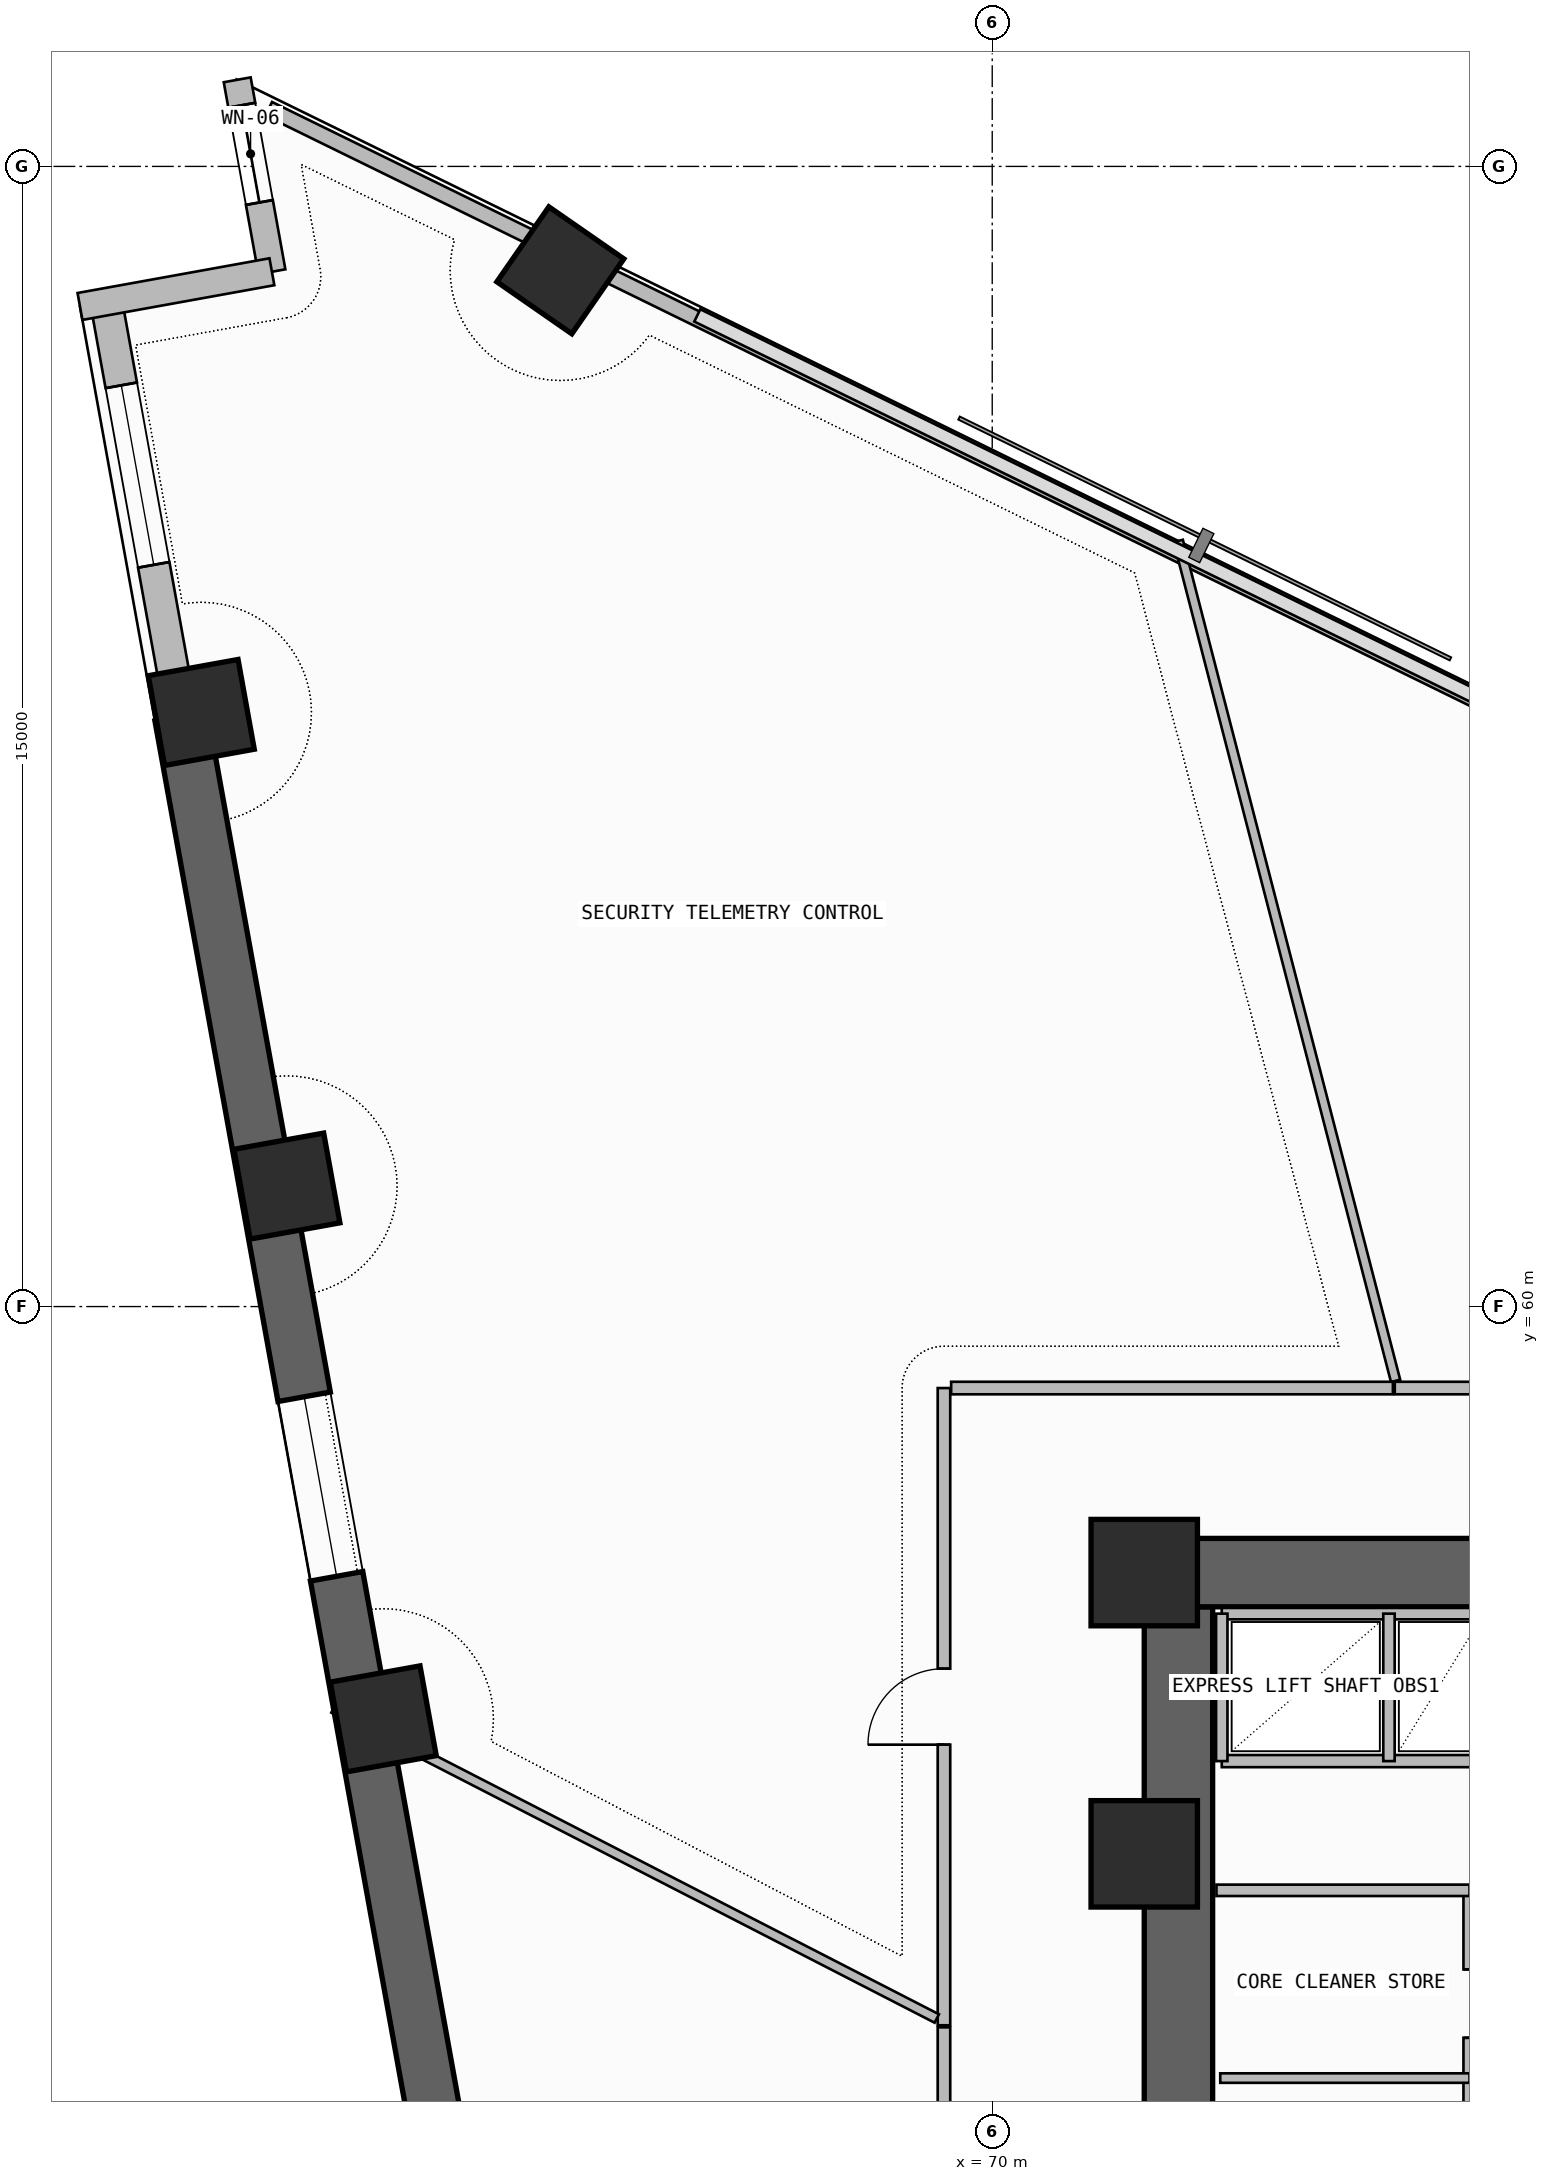
"""IFC4 building model, lengths in metres.
Left out: names, types, materials, properties, quantities, classifications, styles, units other than length and angle.
Written with IfcOpenShell. Run it as: python <this file> out.ifc"""

import sys

from ifc_helpers import new_model, si_unit, direction, frame, frame_2d, origin, origin_2d, place, context, subcontext, project, spatial, rectangle, extrude, element, fill, save


model = new_model("IFC4")
c1 = context("Model", 3, precision=1e-05, world=origin(), true_north=direction((0.0, 1.0)))
c2 = subcontext(c1, "Body", "Model", "MODEL_VIEW")
j1 = project(units=[si_unit("LENGTHUNIT", "METRE"), si_unit("PLANEANGLEUNIT", "RADIAN")], contexts=[c1])
p1 = place(None, origin())
s1 = spatial("IfcSite", under=j1, at=p1, CompositionType="ELEMENT")
p2 = place(p1, origin())
s2 = spatial("IfcBuilding", under=s1, at=p2, CompositionType="ELEMENT")
p3 = place(p2, frame((0.0, 0.0, 113.7)))
s3 = spatial("IfcBuildingStorey", under=s2, at=p3, CompositionType="ELEMENT", Elevation=113.7)
p4 = place(p3, frame((72.45, 43.35, -0.26), z_axis=(0.0, 0.0, 1.0), x_axis=(0.0, 1.0, 0.0)))
e1 = element("IfcWall", 1, at=p4, inside=s3, PredefinedType="SHEAR", context=c2, shape_type="SweptSolid", body=[
    extrude(rectangle(XDim=12.7, YDim=0.9, at=frame_2d((6.35, 0.0))), origin(), (0.0, 0.0, 1.0), 3.6),
])
p5 = place(p4, frame((1.35, 0.0, 0.26)))
e2 = element("IfcOpeningElement", 2, at=p5, cuts=e1, PredefinedType="OPENING", context=c2, shape_type="SweptSolid", body=[
    extrude(rectangle(XDim=1.2, YDim=2.2, at=frame_2d((0.6, 1.1))), frame((0.0, 0.46, 0.0), z_axis=(0.0, -1.0, 0.0), x_axis=(1.0, 0.0, 0.0)), (0.0, 0.0, 1.0), 0.92),
])
p6 = place(p3, frame((72.0, 56.5, -0.26), z_axis=(0.0, 0.0, 1.0), x_axis=(1.0, 0.0, 0.0)))
e3 = element("IfcWall", 3, at=p6, inside=s3, PredefinedType="SHEAR", context=c2, shape_type="SweptSolid", body=[
    extrude(rectangle(XDim=13.9, YDim=0.9, at=frame_2d((6.95, 0.0))), origin(), (0.0, 0.0, 1.0), 3.6),
])
for number, where, z_axis, x_axis in (
    (4, (72.0, 52.8, 0.0), (0.0, 0.0, 1.0), (1.0, 0.0, 0.0)),
    (5, (72.0, 56.5, 0.0), (0.0, 0.0, 1.0), (1.0, 0.0, 0.0)),
):
    element("IfcColumn", number, at=place(p3, frame(where, z_axis=z_axis, x_axis=x_axis)), inside=s3, PredefinedType="COLUMN", context=c2, shape_type="SweptSolid", body=[
        extrude(rectangle(XDim=1.4, YDim=1.4, at=origin_2d()), origin(), (0.0, 0.0, 1.0), 3.6),
    ])
for number, where, z_axis, x_axis in (
    (6, (64.318, 73.633, 0.0), (0.0, 0.0, 1.0), (0.57, 0.822, 0.0)),
    (7, (59.594, 67.816, 0.0), (0.0, 0.0, 1.0), (-0.178, 0.984, 0.0)),
    (8, (60.72, 61.585, 0.0), (0.0, 0.0, 1.0), (-0.178, 0.984, 0.0)),
    (9, (61.988, 54.575, 0.0), (0.0, 0.0, 1.0), (-0.178, 0.984, 0.0)),
):
    element("IfcColumn", number, at=place(p3, frame(where, z_axis=z_axis, x_axis=x_axis)), inside=s3, PredefinedType="COLUMN", context=c2, shape_type="SweptSolid", body=[
        extrude(rectangle(XDim=1.2, YDim=1.2, at=origin_2d()), origin(), (0.0, 0.0, 1.0), 3.6),
    ])
p7 = place(p3, frame((58.342, 73.22, 0.0), z_axis=(0.0, 0.0, 1.0), x_axis=(0.177981837245, -0.984033772597, 0.0)))
e10 = element("IfcWall", 10, at=p7, inside=s3, PredefinedType="SOLIDWALL", context=c2, shape_type="SweptSolid", body=[
    extrude(rectangle(XDim=5.54, YDim=0.42, at=frame_2d((2.77, 0.0))), origin(), (0.0, 0.0, 1.0), 2.725),
])
p8 = place(p7, frame((1.118, 0.0, 1.2)))
e11 = element("IfcOpeningElement", 11, at=p8, cuts=e10, PredefinedType="OPENING", context=c2, shape_type="SweptSolid", body=[
    extrude(rectangle(XDim=2.4, YDim=0.9, at=frame_2d((1.2, 0.45))), frame((0.0, 0.22, 0.0), z_axis=(0.0, -1.0, 0.0), x_axis=(1.0, 0.0, 0.0)), (0.0, 0.0, 1.0), 0.44),
])
p9 = place(p3, frame((59.328, 67.768, -0.26), z_axis=(0.0, 0.0, 1.0), x_axis=(0.177933213615, -0.984042565895, 0.0)))
e12 = element("IfcWall", 12, at=p9, inside=s3, PredefinedType="SHEAR", context=c2, shape_type="SweptSolid", body=[
    extrude(rectangle(XDim=20.579, YDim=0.7, at=frame_2d((10.289, 0.0))), origin(), (0.0, 0.0, 1.0), 3.6),
])
p10 = place(p9, frame((9.1, 0.0, 1.2)))
e13 = element("IfcOpeningElement", 13, at=p10, cuts=e12, PredefinedType="OPENING", context=c2, shape_type="SweptSolid", body=[
    extrude(rectangle(XDim=2.4, YDim=0.9, at=frame_2d((1.2, 0.45))), frame((0.0, 0.36, 0.0), z_axis=(0.0, -1.0, 0.0), x_axis=(1.0, 0.0, 0.0)), (0.0, 0.0, 1.0), 0.72),
])
p11 = place(p3, frame((60.066, 76.139, 0.0), z_axis=(0.0, 0.0, 1.0), x_axis=(0.177897493713, -0.984049024048, 0.0)))
e14 = element("IfcWall", 14, at=p11, inside=s3, PredefinedType="SOLIDWALL", context=c2, shape_type="SweptSolid", body=[
    extrude(rectangle(XDim=2.566, YDim=0.36, at=frame_2d((1.283, 0.0))), origin(), (0.0, 0.0, 1.0), 3.34),
])
p12 = place(p11, frame((0.34, 0.0, 0.45)))
e15 = element("IfcOpeningElement", 15, at=p12, cuts=e14, PredefinedType="OPENING", context=c2, shape_type="SweptSolid", body=[
    extrude(rectangle(XDim=1.3, YDim=2.4, at=frame_2d((0.65, 1.2))), frame((0.0, 0.19, 0.0), z_axis=(0.0, -1.0, 0.0), x_axis=(1.0, 0.0, 0.0)), (0.0, 0.0, 1.0), 0.38),
])
p13 = place(p3, frame((60.523, 73.614, 0.0), z_axis=(0.0, 0.0, 1.0), x_axis=(-0.984046012923, -0.177914149102, 0.0)))
e16 = element("IfcWall", 16, at=p13, inside=s3, PredefinedType="SOLIDWALL", context=c2, shape_type="SweptSolid", body=[
    extrude(rectangle(XDim=2.566, YDim=0.36, at=frame_2d((1.283, 0.0))), origin(), (0.0, 0.0, 1.0), 3.34),
])
p14 = place(p3, frame((88.921, 61.823, 0.0), z_axis=(0.0, 0.0, 1.0), x_axis=(-0.897993533426, 0.440008652103, 0.0)))
e17 = element("IfcWall", 17, at=p14, inside=s3, PredefinedType="PARAPET", context=c2, shape_type="SweptSolid", body=[
    extrude(rectangle(XDim=26.864, YDim=0.2, at=frame_2d((13.432, 0.0))), origin(), (0.0, 0.0, 1.0), 1.15),
])
p15 = place(p3, frame((64.032, 74.018, 0.0), z_axis=(0.0, 0.0, 1.0), x_axis=(-0.89799103332, 0.440013754417, 0.0)))
e18 = element("IfcWall", 18, at=p15, inside=s3, PredefinedType="PARAPET", context=c2, shape_type="SweptSolid", body=[
    extrude(rectangle(XDim=3.955, YDim=0.2, at=frame_2d((1.978, 0.0))), origin(), (0.0, 0.0, 1.0), 1.15),
])
p16 = place(p3, frame((76.28, 47.18, 0.0), z_axis=(0.0, 0.0, 1.0), x_axis=(0.0, 1.0, 0.0)))
e19 = element("IfcWall", 19, at=p16, inside=s3, PredefinedType="SOLIDWALL", context=c2, shape_type="SweptSolid", body=[
    extrude(rectangle(XDim=5.14, YDim=0.16, at=frame_2d((2.57, 0.0))), origin(), (0.0, 0.0, 1.0), 3.34),
])
p17 = place(p16, frame((0.75, 0.0, 0.0)))
e20 = element("IfcOpeningElement", 20, at=p17, cuts=e19, PredefinedType="OPENING", context=c2, shape_type="SweptSolid", body=[
    extrude(rectangle(XDim=1.0, YDim=2.2, at=frame_2d((0.5, 1.1))), frame((0.0, 0.09, 0.0), z_axis=(0.0, -1.0, 0.0), x_axis=(1.0, 0.0, 0.0)), (0.0, 0.0, 1.0), 0.18),
])
p18 = place(p16, frame((3.2, 0.0, 0.0)))
e21 = element("IfcOpeningElement", 21, at=p18, cuts=e19, PredefinedType="OPENING", context=c2, shape_type="SweptSolid", body=[
    extrude(rectangle(XDim=0.9, YDim=2.1, at=frame_2d((0.45, 1.05))), frame((0.0, 0.09, 0.0), z_axis=(0.0, -1.0, 0.0), x_axis=(1.0, 0.0, 0.0)), (0.0, 0.0, 1.0), 0.18),
])
p19 = place(p3, frame((72.95, 52.32, 0.0), z_axis=(0.0, 0.0, 1.0), x_axis=(1.0, 0.0, 0.0)))
e22 = element("IfcWall", 22, at=p19, inside=s3, PredefinedType="SOLIDWALL", context=c2, shape_type="SweptSolid", body=[
    extrude(rectangle(XDim=3.33, YDim=0.15, at=frame_2d((1.665, 0.0))), origin(), (0.0, 0.0, 1.0), 3.34),
])
p20 = place(p3, frame((73.0, 49.85, 0.0), z_axis=(0.0, 0.0, 1.0), x_axis=(1.0, 0.0, 0.0)))
e23 = element("IfcWall", 23, at=p20, inside=s3, PredefinedType="PARTITIONING", context=c2, shape_type="SweptSolid", body=[
    extrude(rectangle(XDim=3.28, YDim=0.125, at=frame_2d((1.64, 0.0))), origin(), (0.0, 0.0, 1.0), 3.34),
])
p21 = place(p3, frame((73.02, 54.02, 0.0), z_axis=(0.0, 0.0, 1.0), x_axis=(1.0, 0.0, 0.0)))
e24 = element("IfcWall", 24, at=p21, inside=s3, PredefinedType="SOLIDWALL", context=c2, shape_type="SweptSolid", body=[
    extrude(rectangle(XDim=12.08, YDim=0.16, at=frame_2d((6.04, 0.0))), origin(), (0.0, 0.0, 1.0), 3.34),
])
p22 = place(p3, frame((73.02, 55.96, 0.0), z_axis=(0.0, 0.0, 1.0), x_axis=(1.0, 0.0, 0.0)))
e25 = element("IfcWall", 25, at=p22, inside=s3, PredefinedType="SOLIDWALL", context=c2, shape_type="SweptSolid", body=[
    extrude(rectangle(XDim=3.5, YDim=0.15, at=frame_2d((1.75, 0.0))), origin(), (0.0, 0.0, 1.0), 3.34),
])
for number, where, z_axis, x_axis in (
    (26, (73.02, 54.02, 0.0), (0.0, 0.0, 1.0), (0.0, 1.0, 0.0)),
    (27, (75.22, 54.02, 0.0), (0.0, 0.0, 1.0), (0.0, 1.0, 0.0)),
):
    element("IfcWall", number, at=place(p3, frame(where, z_axis=z_axis, x_axis=x_axis)), inside=s3, PredefinedType="PLUMBINGWALL", context=c2, shape_type="SweptSolid", body=[
        extrude(rectangle(XDim=1.94, YDim=0.15, at=frame_2d((0.97, 0.0))), origin(), (0.0, 0.0, 1.0), 3.34),
    ])
p23 = place(p3, frame((93.396, 58.928, 0.0), z_axis=(0.0, 0.0, 1.0), x_axis=(-1.0, 0.0, 0.0)))
e28 = element("IfcWall", 28, at=p23, inside=s3, PredefinedType="PARTITIONING", context=c2, shape_type="SweptSolid", body=[
    extrude(rectangle(XDim=18.1, YDim=0.165, at=frame_2d((9.05, 0.0))), origin(), (0.0, 0.0, 1.0), 2.725),
])
p24 = place(p23, frame((3.874, 0.0, 0.0)))
e29 = element("IfcOpeningElement", 29, at=p24, cuts=e28, PredefinedType="OPENING", context=c2, shape_type="SweptSolid", body=[
    extrude(rectangle(XDim=1.0, YDim=2.2, at=frame_2d((0.5, 1.1))), frame((0.0, 0.093, 0.0), z_axis=(0.0, -1.0, 0.0), x_axis=(1.0, 0.0, 0.0)), (0.0, 0.0, 1.0), 0.185),
])
p25 = place(p3, frame((75.307, 59.022, 0.0), z_axis=(0.0, 0.0, 1.0), x_axis=(-0.250514518309, 0.968112842656, 0.0)))
e30 = element("IfcWall", 30, at=p25, inside=s3, PredefinedType="PARTITIONING", context=c2, shape_type="SweptSolid", body=[
    extrude(rectangle(XDim=11.414, YDim=0.125, at=frame_2d((5.707, 0.0))), origin(), (0.0, 0.0, 1.0), 3.34),
])
p26 = place(p3, frame((69.365, 58.928, 0.0), z_axis=(0.0, 0.0, 1.0), x_axis=(0.0, -1.0, 0.0)))
e31 = element("IfcWall", 31, at=p26, inside=s3, PredefinedType="PARTITIONING", context=c2, shape_type="SweptSolid", body=[
    extrude(rectangle(XDim=8.384, YDim=0.165, at=frame_2d((4.192, 0.0))), origin(), (0.0, 0.0, 1.0), 2.725),
])
p27 = place(p26, frame((3.692, 0.0, 0.0)))
e32 = element("IfcOpeningElement", 32, at=p27, cuts=e31, PredefinedType="OPENING", context=c2, shape_type="SweptSolid", body=[
    extrude(rectangle(XDim=1.0, YDim=2.2, at=frame_2d((0.5, 1.1))), frame((0.0, 0.093, 0.0), z_axis=(0.0, -1.0, 0.0), x_axis=(1.0, 0.0, 0.0)), (0.0, 0.0, 1.0), 0.185),
])
p28 = place(p3, frame((75.271, 58.928, 0.0), z_axis=(0.0, 0.0, 1.0), x_axis=(-1.0, 0.0, 0.0)))
e33 = element("IfcWall", 33, at=p28, inside=s3, PredefinedType="PARTITIONING", context=c2, shape_type="SweptSolid", body=[
    extrude(rectangle(XDim=5.812, YDim=0.165, at=frame_2d((2.906, 0.0))), origin(), (0.0, 0.0, 1.0), 2.725),
])
p29 = place(p3, frame((69.271, 50.634, 0.0), z_axis=(0.0, 0.0, 1.0), x_axis=(-0.889409837341, 0.457110644418, 0.0)))
e34 = element("IfcWall", 34, at=p29, inside=s3, PredefinedType="PARTITIONING", context=c2, shape_type="SweptSolid", body=[
    extrude(rectangle(XDim=8.925, YDim=0.125, at=frame_2d((4.462, 0.0))), origin(), (0.0, 0.0, 1.0), 2.725),
])
p30 = place(p3, frame((69.365, 50.518, 0.0), z_axis=(0.0, 0.0, 1.0), x_axis=(0.0, -1.0, 0.0)))
e35 = element("IfcWall", 35, at=p30, inside=s3, PredefinedType="PARTITIONING", context=c2, shape_type="SweptSolid", body=[
    extrude(rectangle(XDim=8.345, YDim=0.165, at=frame_2d((4.173, 0.0))), origin(), (0.0, 0.0, 1.0), 3.34),
])
p31 = place(p30, frame((3.673, 0.0, 0.0)))
e36 = element("IfcOpeningElement", 36, at=p31, cuts=e35, PredefinedType="OPENING", context=c2, shape_type="SweptSolid", body=[
    extrude(rectangle(XDim=1.0, YDim=2.2, at=frame_2d((0.5, 1.1))), frame((0.0, 0.093, 0.0), z_axis=(0.0, -1.0, 0.0), x_axis=(1.0, 0.0, 0.0)), (0.0, 0.0, 1.0), 0.185),
])
p32 = place(p8, origin())
e37 = element("IfcWindow", 37, at=p32, inside=s3, PartitioningType="SINGLE_PANEL", PredefinedType="WINDOW", context=c2, shape_type="SweptSolid", body=[
    extrude(rectangle(XDim=2.4, YDim=0.9, at=frame_2d((1.2, 0.45))), frame((0.0, 0.03, 0.0), z_axis=(0.0, -1.0, 0.0), x_axis=(1.0, 0.0, 0.0)), (0.0, 0.0, 1.0), 0.06),
])
fill(e11, e37)
p33 = place(p10, origin())
e38 = element("IfcWindow", 38, at=p33, inside=s3, PartitioningType="SINGLE_PANEL", PredefinedType="WINDOW", context=c2, shape_type="SweptSolid", body=[
    extrude(rectangle(XDim=2.4, YDim=0.9, at=frame_2d((1.2, 0.45))), frame((0.0, 0.03, 0.0), z_axis=(0.0, -1.0, 0.0), x_axis=(1.0, 0.0, 0.0)), (0.0, 0.0, 1.0), 0.06),
])
fill(e13, e38)
p34 = place(p12, origin())
e39 = element("IfcWindow", 39, at=p34, inside=s3, PartitioningType="SINGLE_PANEL", PredefinedType="WINDOW", context=c2, shape_type="SweptSolid", body=[
    extrude(rectangle(XDim=1.3, YDim=2.4, at=frame_2d((0.65, 1.2))), frame((0.0, 0.03, 0.0), z_axis=(0.0, -1.0, 0.0), x_axis=(1.0, 0.0, 0.0)), (0.0, 0.0, 1.0), 0.06),
])
fill(e15, e39)
p35 = place(p18, frame((0.9, 0.0, 0.0), z_axis=(0.0, 0.0, 1.0), x_axis=(-1.0, 0.0, 0.0)))
e40 = element("IfcDoor", 40, at=p35, inside=s3, OperationType="SINGLE_SWING_RIGHT", PredefinedType="DOOR", context=c2, shape_type="SweptSolid", body=[
    extrude(rectangle(XDim=0.9, YDim=2.1, at=frame_2d((0.45, 1.05))), frame((0.0, 0.025, 0.0), z_axis=(0.0, -1.0, 0.0), x_axis=(1.0, 0.0, 0.0)), (0.0, 0.0, 1.0), 0.05),
])
fill(e21, e40)
p36 = place(p27, frame((1.0, 0.0, 0.0), z_axis=(0.0, 0.0, 1.0), x_axis=(-1.0, 0.0, 0.0)))
e41 = element("IfcDoor", 41, at=p36, inside=s3, OperationType="SINGLE_SWING_LEFT", PredefinedType="DOOR", context=c2, shape_type="SweptSolid", body=[
    extrude(rectangle(XDim=1.0, YDim=2.2, at=frame_2d((0.5, 1.1))), frame((0.0, 0.025, 0.0), z_axis=(0.0, -1.0, 0.0), x_axis=(1.0, 0.0, 0.0)), (0.0, 0.0, 1.0), 0.05),
])
fill(e32, e41)
save(model, sys.argv[1])
